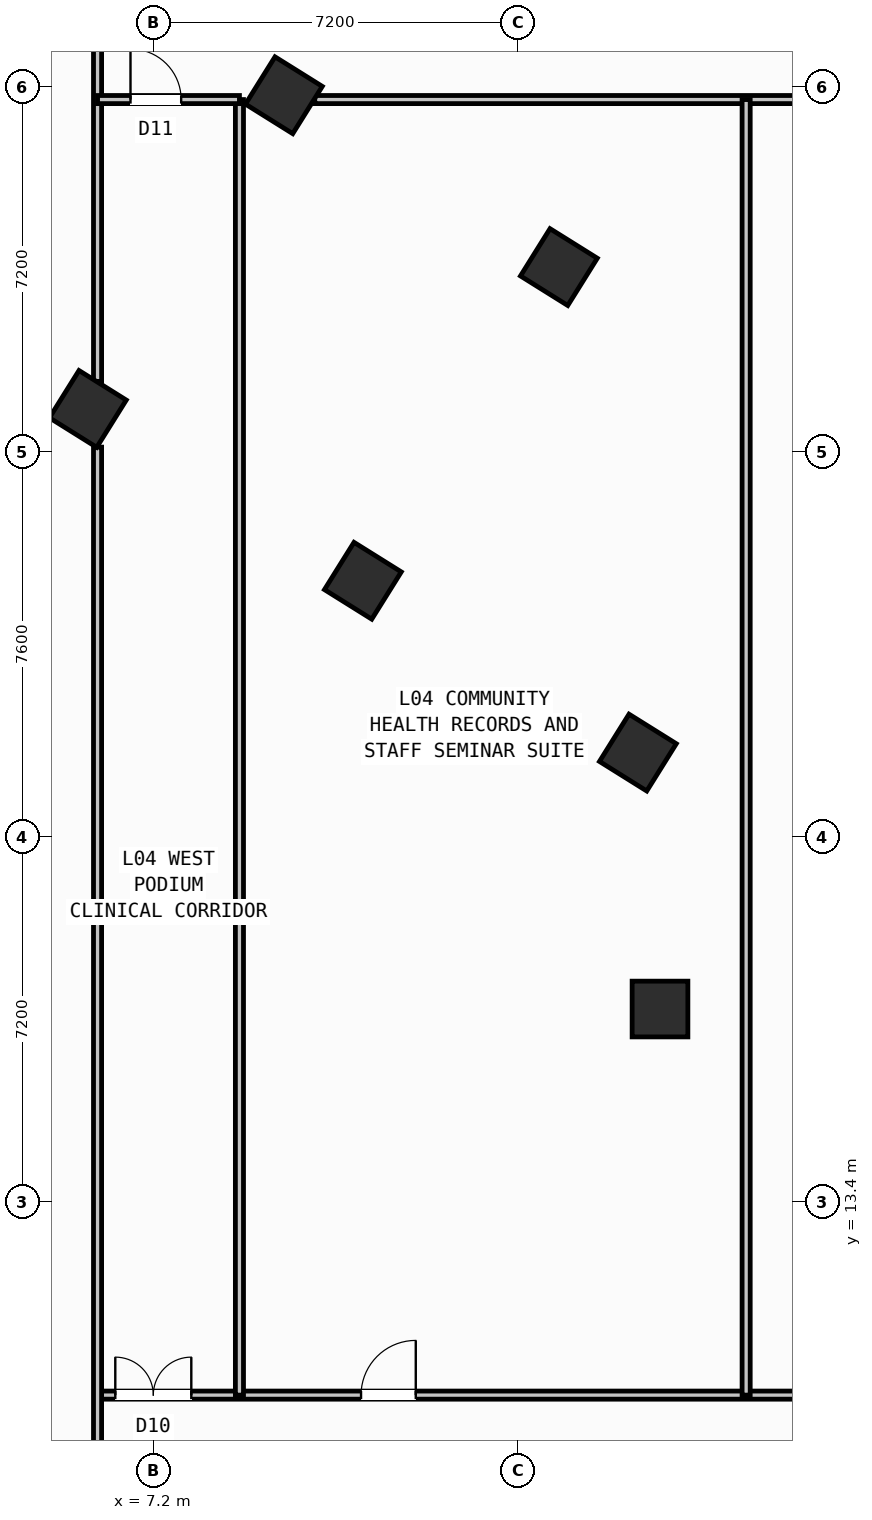
"""IFC4 building model, lengths in metres.
Left out: names, types, materials, properties, quantities, classifications, styles, units other than length and angle.
Written with IfcOpenShell. Run it as: python <this file> out.ifc"""

import sys

from ifc_helpers import new_model, si_unit, direction, frame, frame_2d, origin, origin_2d, place, context, subcontext, project, spatial, rectangle, hollow_rectangle, extrude, source, transform, mapped, element, fill, save


model = new_model("IFC4")
c1 = context("Model", 3, precision=1e-05, world=origin(), true_north=direction((0.0, 1.0)))
c2 = subcontext(c1, "Body", "Model", "MODEL_VIEW")
j1 = project(units=[si_unit("LENGTHUNIT", "METRE"), si_unit("PLANEANGLEUNIT", "RADIAN")], contexts=[c1])
p1 = place(None, origin())
s1 = spatial("IfcSite", under=j1, at=p1, CompositionType="ELEMENT")
p2 = place(p1, origin())
s2 = spatial("IfcBuilding", under=s1, at=p2, CompositionType="ELEMENT")
p3 = place(p2, frame((0.0, 0.0, 18.6)))
s3 = spatial("IfcBuildingStorey", under=s2, at=p3, CompositionType="ELEMENT", Elevation=18.6)
m1 = source(origin(), c2, "Body", "SweptSolid", [
    extrude(hollow_rectangle(XDim=1.1, YDim=1.1, WallThickness=0.04, at=origin_2d()), origin(), (0.0, 0.0, 1.0), 5.4),
])
for number, where, z_axis, x_axis in (
    (1, (17.2, 17.2, 0.0), (0.0, 0.0, 1.0), (1.0, 0.0, 0.0)),
    (2, (16.764, 22.261, 0.0), (0.0, 0.0, 1.0), (-0.848, 0.53, 0.0)),
    (3, (15.205, 31.844, 0.0), (0.0, 0.0, 1.0), (-0.848, 0.53, 0.0)),
    (4, (11.336, 25.653, 0.0), (0.0, 0.0, 1.0), (-0.848, 0.53, 0.0)),
    (5, (9.777, 35.235, 0.0), (0.0, 0.0, 1.0), (-0.848, 0.53, 0.0)),
    (6, (5.909, 29.044, 0.0), (0.0, 0.0, 1.0), (-0.848, 0.53, 0.0)),
):
    element("IfcColumn", number, at=place(p3, frame(where, z_axis=z_axis, x_axis=x_axis)), inside=s3, PredefinedType="COLUMN", context=c2, shape_type="MappedRepresentation", body=[
        mapped(m1, transform((0.0, 0.0, 0.0), scale=1.0)),
    ])
p4 = place(p3, frame((6.1, 9.58, 0.0), z_axis=(0.0, 0.0, 1.0), x_axis=(1.0, 0.0, 0.0)))
e7 = element("IfcWall", 7, at=p4, inside=s3, PredefinedType="PARTITIONING", context=c2, shape_type="SweptSolid", body=[
    extrude(rectangle(XDim=62.1, YDim=0.16, at=frame_2d((31.05, 0.0))), origin(), (0.0, 0.0, 1.0), 4.94),
])
p5 = place(p4, frame((29.0, 0.0, 0.0)))
e8 = element("IfcOpeningElement", 8, at=p5, cuts=e7, PredefinedType="OPENING", context=c2, shape_type="SweptSolid", body=[
    extrude(rectangle(XDim=1.7, YDim=2.2, at=frame_2d((0.85, 1.1))), frame((0.0, 0.09, 0.0), z_axis=(0.0, -1.0, 0.0), x_axis=(1.0, 0.0, 0.0)), (0.0, 0.0, 1.0), 0.18),
])
p6 = place(p4, frame((0.35, 0.0, 0.0)))
e9 = element("IfcOpeningElement", 9, at=p6, cuts=e7, PredefinedType="OPENING", context=c2, shape_type="SweptSolid", body=[
    extrude(rectangle(XDim=1.5, YDim=2.15, at=frame_2d((0.75, 1.075))), frame((0.0, 0.09, 0.0), z_axis=(0.0, -1.0, 0.0), x_axis=(1.0, 0.0, 0.0)), (0.0, 0.0, 1.0), 0.18),
])
p7 = place(p4, frame((5.2, 0.0, 0.0)))
e10 = element("IfcOpeningElement", 10, at=p7, cuts=e7, PredefinedType="OPENING", context=c2, shape_type="SweptSolid", body=[
    extrude(rectangle(XDim=1.08, YDim=2.15, at=frame_2d((0.54, 1.075))), frame((0.0, 0.09, 0.0), z_axis=(0.0, -1.0, 0.0), x_axis=(1.0, 0.0, 0.0)), (0.0, 0.0, 1.0), 0.18),
])
p8 = place(p4, frame((58.5, 0.0, 0.0)))
e11 = element("IfcOpeningElement", 11, at=p8, cuts=e7, PredefinedType="OPENING", context=c2, shape_type="SweptSolid", body=[
    extrude(rectangle(XDim=1.08, YDim=2.15, at=frame_2d((0.54, 1.075))), frame((0.0, 0.09, 0.0), z_axis=(0.0, -1.0, 0.0), x_axis=(1.0, 0.0, 0.0)), (0.0, 0.0, 1.0), 0.18),
])
p9 = place(p3, frame((6.1, 7.62, 0.0), z_axis=(0.0, 0.0, 1.0), x_axis=(0.0, 1.0, 0.0)))
e12 = element("IfcWall", 12, at=p9, inside=s3, PredefinedType="PARTITIONING", context=c2, shape_type="SweptSolid", body=[
    extrude(rectangle(XDim=20.67, YDim=0.16, at=frame_2d((10.335, 0.0))), origin(), (0.0, 0.0, 1.0), 4.94),
])
p10 = place(p3, frame((6.1, 29.587, 0.0), z_axis=(0.0, 0.0, 1.0), x_axis=(0.0, 1.0, 0.0)))
e13 = element("IfcWall", 13, at=p10, inside=s3, PredefinedType="PARTITIONING", context=c2, shape_type="SweptSolid", body=[
    extrude(rectangle(XDim=9.413, YDim=0.16, at=frame_2d((4.706, 0.0))), origin(), (0.0, 0.0, 1.0), 4.94),
])
p11 = place(p3, frame((8.9, 9.58, 0.0), z_axis=(0.0, 0.0, 1.0), x_axis=(0.0, 1.0, 0.0)))
e14 = element("IfcWall", 14, at=p11, inside=s3, PredefinedType="PARTITIONING", context=c2, shape_type="SweptSolid", body=[
    extrude(rectangle(XDim=25.57, YDim=0.16, at=frame_2d((12.785, 0.0))), origin(), (0.0, 0.0, 1.0), 4.94),
])
p12 = place(p3, frame((10.386, 35.15, 0.0), z_axis=(0.0, 0.0, 1.0), x_axis=(1.0, 0.0, 0.0)))
e15 = element("IfcWall", 15, at=p12, inside=s3, PredefinedType="PARTITIONING", context=c2, shape_type="SweptSolid", body=[
    extrude(rectangle(XDim=13.768, YDim=0.16, at=frame_2d((6.884, 0.0))), origin(), (0.0, 0.0, 1.0), 4.94),
])
p13 = place(p3, frame((6.1, 35.15, 0.0), z_axis=(0.0, 0.0, 1.0), x_axis=(1.0, 0.0, 0.0)))
e16 = element("IfcWall", 16, at=p13, inside=s3, PredefinedType="PARTITIONING", context=c2, shape_type="SweptSolid", body=[
    extrude(rectangle(XDim=2.8, YDim=0.16, at=frame_2d((1.4, 0.0))), origin(), (0.0, 0.0, 1.0), 4.94),
])
p14 = place(p13, frame((0.65, 0.0, 0.0)))
e17 = element("IfcOpeningElement", 17, at=p14, cuts=e16, PredefinedType="OPENING", context=c2, shape_type="SweptSolid", body=[
    extrude(rectangle(XDim=1.0, YDim=2.1, at=frame_2d((0.5, 1.05))), frame((0.0, 0.09, 0.0), z_axis=(0.0, -1.0, 0.0), x_axis=(1.0, 0.0, 0.0)), (0.0, 0.0, 1.0), 0.18),
])
p15 = place(p3, frame((18.9, 9.58, 0.0), z_axis=(0.0, 0.0, 1.0), x_axis=(0.0, 1.0, 0.0)))
e18 = element("IfcWall", 18, at=p15, inside=s3, PredefinedType="PARTITIONING", context=c2, shape_type="SweptSolid", body=[
    extrude(rectangle(XDim=25.57, YDim=0.16, at=frame_2d((12.785, 0.0))), origin(), (0.0, 0.0, 1.0), 4.94),
])
m2 = source(origin(), c2, "Body", "SweptSolid", [
    extrude(rectangle(XDim=1.5, YDim=2.15, at=frame_2d((0.75, 1.075))), frame((0.0, 0.025, 0.0), z_axis=(0.0, -1.0, 0.0), x_axis=(1.0, 0.0, 0.0)), (0.0, 0.0, 1.0), 0.05),
])
p16 = place(p6, origin())
e19 = element("IfcDoor", 19, at=p16, inside=s3, OperationType="DOUBLE_DOOR_SINGLE_SWING", PredefinedType="DOOR", context=c2, shape_type="MappedRepresentation", body=[
    mapped(m2, transform((0.0, 0.0, 0.0), scale=1.0)),
])
fill(e9, e19)
m3 = source(origin(), c2, "Body", "SweptSolid", [
    extrude(rectangle(XDim=1.0, YDim=2.1, at=frame_2d((0.5, 1.05))), frame((0.0, 0.025, 0.0), z_axis=(0.0, -1.0, 0.0), x_axis=(1.0, 0.0, 0.0)), (0.0, 0.0, 1.0), 0.05),
])
p17 = place(p14, origin())
e20 = element("IfcDoor", 20, at=p17, inside=s3, OperationType="SINGLE_SWING_LEFT", PredefinedType="DOOR", context=c2, shape_type="MappedRepresentation", body=[
    mapped(m3, transform((0.0, 0.0, 0.0), scale=1.0)),
])
fill(e17, e20)
m4 = source(origin(), c2, "Body", "SweptSolid", [
    extrude(rectangle(XDim=1.08, YDim=2.15, at=frame_2d((0.54, 1.075))), frame((0.0, 0.025, 0.0), z_axis=(0.0, -1.0, 0.0), x_axis=(1.0, 0.0, 0.0)), (0.0, 0.0, 1.0), 0.05),
])
p18 = place(p7, origin())
e21 = element("IfcDoor", 21, at=p18, inside=s3, OperationType="SINGLE_SWING_RIGHT", PredefinedType="DOOR", context=c2, shape_type="MappedRepresentation", body=[
    mapped(m4, transform((0.0, 0.0, 0.0), scale=1.0)),
])
fill(e10, e21)
save(model, sys.argv[1])
